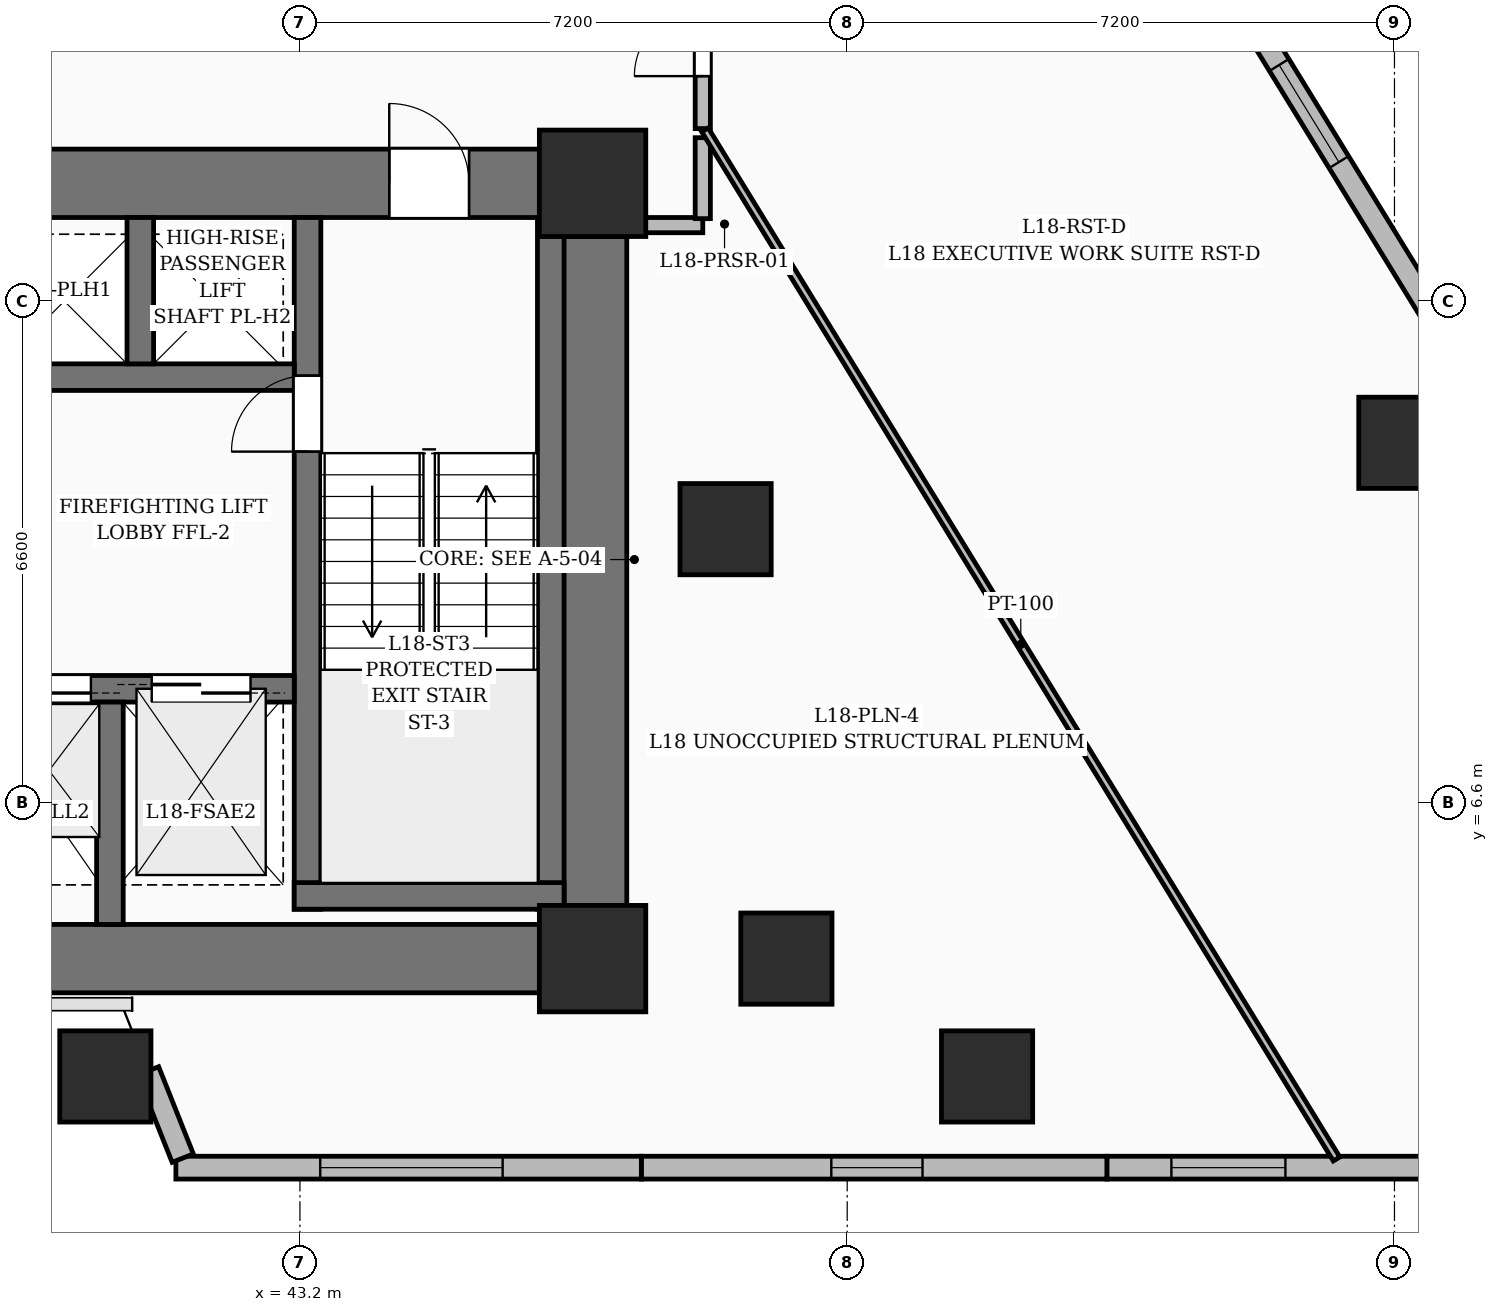
"""IFC4 building model, lengths in metres.
Left out: names, types, materials, properties, quantities, classifications, styles, units other than length and angle.
Written with IfcOpenShell. Run it as: python <this file> out.ifc"""

import sys

from ifc_helpers import new_model, si_unit, direction, frame, frame_2d, origin, origin_2d, place, context, subcontext, project, spatial, rectangle, extrude, element, fill, save


model = new_model("IFC4")
c1 = context("Model", 3, precision=1e-05, world=origin(), true_north=direction((0.0, 1.0)))
c2 = subcontext(c1, "Body", "Model", "MODEL_VIEW")
j1 = project(units=[si_unit("LENGTHUNIT", "METRE"), si_unit("PLANEANGLEUNIT", "RADIAN")], contexts=[c1])
p1 = place(None, origin())
s1 = spatial("IfcSite", under=j1, at=p1, CompositionType="ELEMENT")
p2 = place(p1, origin())
s2 = spatial("IfcBuilding", under=s1, at=p2, CompositionType="ELEMENT")
p3 = place(p2, frame((0.0, 0.0, 75.0)))
s3 = spatial("IfcBuildingStorey", under=s2, at=p3, CompositionType="ELEMENT", Elevation=75.0)
for number, where, z_axis, x_axis in (
    (1, (47.05, 4.55, 0.0), (0.0, 0.0, 1.0), (1.0, 0.0, 0.0)),
    (2, (47.05, 14.75, 0.0), (0.0, 0.0, 1.0), (1.0, 0.0, 0.0)),
):
    element("IfcColumn", number, at=place(p3, frame(where, z_axis=z_axis, x_axis=x_axis)), inside=s3, PredefinedType="COLUMN", context=c2, shape_type="SweptSolid", body=[
        extrude(rectangle(XDim=1.4, YDim=1.4, at=origin_2d()), origin(), (0.0, 0.0, 1.0), 3.6),
    ])
for number, where, z_axis, x_axis in (
    (3, (49.6, 4.55, 0.0), (0.0, 0.0, 1.0), (1.0, 0.0, 0.0)),
    (4, (48.8, 10.2, 0.0), (0.0, 0.0, 1.0), (1.0, 0.0, 0.0)),
):
    element("IfcColumn", number, at=place(p3, frame(where, z_axis=z_axis, x_axis=x_axis)), inside=s3, PredefinedType="COLUMN", context=c2, shape_type="SweptSolid", body=[
        extrude(rectangle(XDim=1.2, YDim=1.2, at=origin_2d()), origin(), (0.0, 0.0, 1.0), 3.6),
    ])
p4 = place(p3, frame((35.85, 4.55, 0.0), z_axis=(0.0, 0.0, 1.0), x_axis=(1.0, 0.0, 0.0)))
e5 = element("IfcWall", 5, at=p4, inside=s3, PredefinedType="SHEAR", context=c2, shape_type="SweptSolid", body=[
    extrude(rectangle(XDim=10.5, YDim=0.9, at=frame_2d((5.25, 0.0))), origin(), (0.0, 0.0, 1.0), 3.6),
])
p5 = place(p3, frame((35.85, 14.75, 0.0), z_axis=(0.0, 0.0, 1.0), x_axis=(1.0, 0.0, 0.0)))
e6 = element("IfcWall", 6, at=p5, inside=s3, PredefinedType="SHEAR", context=c2, shape_type="SweptSolid", body=[
    extrude(rectangle(XDim=10.5, YDim=0.9, at=frame_2d((5.25, 0.0))), origin(), (0.0, 0.0, 1.0), 3.6),
])
p6 = place(p5, frame((0.925, 0.0, 0.0)))
e7 = element("IfcOpeningElement", 7, at=p6, cuts=e6, PredefinedType="OPENING", context=c2, shape_type="SweptSolid", body=[
    extrude(rectangle(XDim=1.05, YDim=2.15, at=frame_2d((0.525, 1.075))), frame((0.0, 0.46, 0.0), z_axis=(0.0, -1.0, 0.0), x_axis=(1.0, 0.0, 0.0)), (0.0, 0.0, 1.0), 0.92),
])
p7 = place(p5, frame((8.525, 0.0, 0.0)))
e8 = element("IfcOpeningElement", 8, at=p7, cuts=e6, PredefinedType="OPENING", context=c2, shape_type="SweptSolid", body=[
    extrude(rectangle(XDim=1.05, YDim=2.15, at=frame_2d((0.525, 1.075))), frame((0.0, 0.46, 0.0), z_axis=(0.0, -1.0, 0.0), x_axis=(1.0, 0.0, 0.0)), (0.0, 0.0, 1.0), 0.92),
])
p8 = place(p3, frame((47.05, 5.25, 0.0), z_axis=(0.0, 0.0, 1.0), x_axis=(0.0, 1.0, 0.0)))
e9 = element("IfcWall", 9, at=p8, inside=s3, PredefinedType="SHEAR", context=c2, shape_type="SweptSolid", body=[
    extrude(rectangle(XDim=8.8, YDim=0.9, at=frame_2d((4.4, 0.0))), origin(), (0.0, 0.0, 1.0), 3.6),
])
p9 = place(p3, frame((43.3, 5.2, 0.0), z_axis=(0.0, 0.0, 1.0), x_axis=(0.0, 1.0, 0.0)))
e10 = element("IfcWall", 10, at=p9, inside=s3, PredefinedType="SOLIDWALL", context=c2, shape_type="SweptSolid", body=[
    extrude(rectangle(XDim=9.1, YDim=0.35, at=frame_2d((4.55, 0.0))), origin(), (0.0, 0.0, 1.0), 3.6),
])
p10 = place(p9, frame((6.02, 0.0, 0.0)))
e11 = element("IfcOpeningElement", 11, at=p10, cuts=e10, PredefinedType="OPENING", context=c2, shape_type="SweptSolid", body=[
    extrude(rectangle(XDim=1.0, YDim=2.15, at=frame_2d((0.5, 1.075))), frame((0.0, 0.185, 0.0), z_axis=(0.0, -1.0, 0.0), x_axis=(1.0, 0.0, 0.0)), (0.0, 0.0, 1.0), 0.37),
])
p11 = place(p3, frame((46.5, 5.2, 0.0), z_axis=(0.0, 0.0, 1.0), x_axis=(0.0, 1.0, 0.0)))
e12 = element("IfcWall", 12, at=p11, inside=s3, PredefinedType="SOLIDWALL", context=c2, shape_type="SweptSolid", body=[
    extrude(rectangle(XDim=9.1, YDim=0.35, at=frame_2d((4.55, 0.0))), origin(), (0.0, 0.0, 1.0), 3.6),
])
p12 = place(p3, frame((43.125, 5.375, 0.0), z_axis=(0.0, 0.0, 1.0), x_axis=(1.0, 0.0, 0.0)))
e13 = element("IfcWall", 13, at=p12, inside=s3, PredefinedType="SOLIDWALL", context=c2, shape_type="SweptSolid", body=[
    extrude(rectangle(XDim=3.55, YDim=0.35, at=frame_2d((1.775, 0.0))), origin(), (0.0, 0.0, 1.0), 3.6),
])
p13 = place(p3, frame((39.075, 8.1, 0.0), z_axis=(0.0, 0.0, 1.0), x_axis=(1.0, 0.0, 0.0)))
e14 = element("IfcWall", 14, at=p13, inside=s3, PredefinedType="SOLIDWALL", context=c2, shape_type="SweptSolid", body=[
    extrude(rectangle(XDim=4.05, YDim=0.35, at=frame_2d((2.025, 0.0))), origin(), (0.0, 0.0, 1.0), 3.6),
])
p14 = place(p13, frame((2.175, 0.0, 0.0)))
e15 = element("IfcOpeningElement", 15, at=p14, cuts=e14, PredefinedType="OPENING", context=c2, shape_type="SweptSolid", body=[
    extrude(rectangle(XDim=1.3, YDim=2.25, at=frame_2d((0.65, 1.125))), frame((0.0, 0.185, 0.0), z_axis=(0.0, -1.0, 0.0), x_axis=(1.0, 0.0, 0.0)), (0.0, 0.0, 1.0), 0.37),
])
p15 = place(p13, frame((0.275, 0.0, 0.0)))
e16 = element("IfcOpeningElement", 16, at=p15, cuts=e14, PredefinedType="OPENING", context=c2, shape_type="SweptSolid", body=[
    extrude(rectangle(XDim=1.1, YDim=2.2, at=frame_2d((0.55, 1.1))), frame((0.0, 0.185, 0.0), z_axis=(0.0, -1.0, 0.0), x_axis=(1.0, 0.0, 0.0)), (0.0, 0.0, 1.0), 0.37),
])
p16 = place(p3, frame((40.7, 5.0, 0.0), z_axis=(0.0, 0.0, 1.0), x_axis=(0.0, 1.0, 0.0)))
e17 = element("IfcWall", 17, at=p16, inside=s3, PredefinedType="SOLIDWALL", context=c2, shape_type="SweptSolid", body=[
    extrude(rectangle(XDim=2.925, YDim=0.35, at=frame_2d((1.462, 0.0))), origin(), (0.0, 0.0, 1.0), 3.6),
])
p17 = place(p3, frame((39.075, 12.2, 0.0), z_axis=(0.0, 0.0, 1.0), x_axis=(1.0, 0.0, 0.0)))
e18 = element("IfcWall", 18, at=p17, inside=s3, PredefinedType="SOLIDWALL", context=c2, shape_type="SweptSolid", body=[
    extrude(rectangle(XDim=4.05, YDim=0.35, at=frame_2d((2.025, 0.0))), origin(), (0.0, 0.0, 1.0), 3.6),
])
p18 = place(p3, frame((41.1, 12.375, 0.0), z_axis=(0.0, 0.0, 1.0), x_axis=(0.0, 1.0, 0.0)))
e19 = element("IfcWall", 19, at=p18, inside=s3, PredefinedType="SOLIDWALL", context=c2, shape_type="SweptSolid", body=[
    extrude(rectangle(XDim=1.925, YDim=0.35, at=frame_2d((0.962, 0.0))), origin(), (0.0, 0.0, 1.0), 3.6),
])
for number, where, z_axis, x_axis in (
    (20, (40.64, 3.0, 0.0), (0.0, 0.0, 1.0), (1.0, 0.0, 0.0)),
    (21, (52.24, 3.0, 0.0), (0.0, 0.0, 1.0), (1.0, 0.0, 0.0)),
    (22, (57.73, 11.336, 0.0), (0.0, 0.0, 1.0), (1.0, 0.0, 0.0)),
):
    element("IfcColumn", number, at=place(p3, frame(where, z_axis=z_axis, x_axis=x_axis)), inside=s3, PredefinedType="COLUMN", context=c2, shape_type="SweptSolid", body=[
        extrude(rectangle(XDim=1.2, YDim=1.2, at=origin_2d()), origin(), (0.0, 0.0, 1.0), 3.6),
    ])
p19 = place(p3, frame((54.041, 19.629, 0.0), z_axis=(0.0, 0.0, 1.0), x_axis=(0.523661280051, -0.851926560083, 0.0)))
e23 = element("IfcWall", 23, at=p19, inside=s3, PredefinedType="SOLIDWALL", context=c2, shape_type="SweptSolid", body=[
    extrude(rectangle(XDim=7.934, YDim=0.3, at=frame_2d((3.967, 0.0))), origin(), (0.0, 0.0, 1.0), 3.35),
])
p20 = place(p19, frame((3.9, 0.0, 0.6)))
e24 = element("IfcOpeningElement", 24, at=p20, cuts=e23, PredefinedType="OPENING", context=c2, shape_type="SweptSolid", body=[
    extrude(rectangle(XDim=1.5, YDim=2.1, at=frame_2d((0.75, 1.05))), frame((0.0, 0.16, 0.0), z_axis=(0.0, -1.0, 0.0), x_axis=(1.0, 0.0, 0.0)), (0.0, 0.0, 1.0), 0.32),
])
p21 = place(p3, frame((59.34, 1.8, 0.0), z_axis=(0.0, 0.0, 1.0), x_axis=(-1.0, 0.0, 0.0)))
e25 = element("IfcWall", 25, at=p21, inside=s3, PredefinedType="SOLIDWALL", context=c2, shape_type="SweptSolid", body=[
    extrude(rectangle(XDim=5.524, YDim=0.3, at=frame_2d((2.762, 0.0))), origin(), (0.0, 0.0, 1.0), 3.35),
])
p22 = place(p21, frame((3.175, 0.0, 0.6)))
e26 = element("IfcOpeningElement", 26, at=p22, cuts=e25, PredefinedType="OPENING", context=c2, shape_type="SweptSolid", body=[
    extrude(rectangle(XDim=1.5, YDim=2.1, at=frame_2d((0.75, 1.05))), frame((0.0, 0.16, 0.0), z_axis=(0.0, -1.0, 0.0), x_axis=(1.0, 0.0, 0.0)), (0.0, 0.0, 1.0), 0.32),
])
p23 = place(p3, frame((53.816, 1.8, 0.0), z_axis=(0.0, 0.0, 1.0), x_axis=(-1.0, 0.0, 0.0)))
e27 = element("IfcWall", 27, at=p23, inside=s3, PredefinedType="SOLIDWALL", context=c2, shape_type="SweptSolid", body=[
    extrude(rectangle(XDim=6.124, YDim=0.3, at=frame_2d((3.062, 0.0))), origin(), (0.0, 0.0, 1.0), 3.35),
])
p24 = place(p23, frame((2.425, 0.0, 0.8)))
e28 = element("IfcOpeningElement", 28, at=p24, cuts=e27, PredefinedType="OPENING", context=c2, shape_type="SweptSolid", body=[
    extrude(rectangle(XDim=1.2, YDim=1.8, at=frame_2d((0.6, 0.9))), frame((0.0, 0.16, 0.0), z_axis=(0.0, -1.0, 0.0), x_axis=(1.0, 0.0, 0.0)), (0.0, 0.0, 1.0), 0.32),
])
p25 = place(p3, frame((47.692, 1.8, 0.0), z_axis=(0.0, 0.0, 1.0), x_axis=(-1.0, 0.0, 0.0)))
e29 = element("IfcWall", 29, at=p25, inside=s3, PredefinedType="SOLIDWALL", context=c2, shape_type="SweptSolid", body=[
    extrude(rectangle(XDim=6.124, YDim=0.3, at=frame_2d((3.062, 0.0))), origin(), (0.0, 0.0, 1.0), 3.35),
])
p26 = place(p25, frame((1.825, 0.0, 0.6)))
e30 = element("IfcOpeningElement", 30, at=p26, cuts=e29, PredefinedType="OPENING", context=c2, shape_type="SweptSolid", body=[
    extrude(rectangle(XDim=2.4, YDim=2.1, at=frame_2d((1.2, 1.05))), frame((0.0, 0.16, 0.0), z_axis=(0.0, -1.0, 0.0), x_axis=(1.0, 0.0, 0.0)), (0.0, 0.0, 1.0), 0.32),
])
p27 = place(p3, frame((41.658, 1.925, 0.0), z_axis=(0.0, 0.0, 1.0), x_axis=(-0.369583004586, 0.929197719929, 0.0)))
e31 = element("IfcWall", 31, at=p27, inside=s3, PredefinedType="SOLIDWALL", context=c2, shape_type="SweptSolid", body=[
    extrude(rectangle(XDim=1.235, YDim=0.3, at=frame_2d((0.617, 0.0))), origin(), (0.0, 0.0, 1.0), 2.375),
])
p28 = place(p3, frame((47.5, 14.2, 0.0), z_axis=(0.0, 0.0, 1.0), x_axis=(1.0, 0.0, 0.0)))
e32 = element("IfcWall", 32, at=p28, inside=s3, PredefinedType="PARTITIONING", context=c2, shape_type="SweptSolid", body=[
    extrude(rectangle(XDim=1.0, YDim=0.2, at=frame_2d((0.5, 0.0))), origin(), (0.0, 0.0, 1.0), 3.35),
])
p29 = place(p3, frame((48.5, 14.285, 0.0), z_axis=(0.0, 0.0, 1.0), x_axis=(0.0, 1.0, 0.0)))
e33 = element("IfcWall", 33, at=p29, inside=s3, PredefinedType="PARTITIONING", context=c2, shape_type="SweptSolid", body=[
    extrude(rectangle(XDim=1.065, YDim=0.2, at=frame_2d((0.533, 0.0))), origin(), (0.0, 0.0, 1.0), 3.35),
])
p30 = place(p3, frame((48.5, 15.47, 0.0), z_axis=(0.0, 0.0, 1.0), x_axis=(0.0, 1.0, 0.0)))
e34 = element("IfcWall", 34, at=p30, inside=s3, PredefinedType="PARTITIONING", context=c2, shape_type="SweptSolid", body=[
    extrude(rectangle(XDim=2.28, YDim=0.2, at=frame_2d((1.14, 0.0))), origin(), (0.0, 0.0, 1.0), 2.345),
])
p31 = place(p30, frame((0.69, 0.0, 0.0)))
e35 = element("IfcOpeningElement", 35, at=p31, cuts=e34, PredefinedType="OPENING", context=c2, shape_type="SweptSolid", body=[
    extrude(rectangle(XDim=0.9, YDim=2.1, at=frame_2d((0.45, 1.05))), frame((0.0, 0.11, 0.0), z_axis=(0.0, -1.0, 0.0), x_axis=(1.0, 0.0, 0.0)), (0.0, 0.0, 1.0), 0.22),
])
p32 = place(p3, frame((48.529, 15.453, 0.0), z_axis=(0.0, 0.0, 1.0), x_axis=(0.52306290803, -0.852294077325, 0.0)))
e36 = element("IfcWall", 36, at=p32, inside=s3, PredefinedType="PARTITIONING", context=c2, shape_type="SweptSolid", body=[
    extrude(rectangle(XDim=15.885, YDim=0.1, at=frame_2d((7.943, 0.0))), origin(), (0.0, 0.0, 1.0), 2.345),
])
p33 = place(p20, origin())
e37 = element("IfcWindow", 37, at=p33, inside=s3, PartitioningType="SINGLE_PANEL", PredefinedType="WINDOW", context=c2, shape_type="SweptSolid", body=[
    extrude(rectangle(XDim=1.5, YDim=2.1, at=frame_2d((0.75, 1.05))), frame((0.0, 0.03, 0.0), z_axis=(0.0, -1.0, 0.0), x_axis=(1.0, 0.0, 0.0)), (0.0, 0.0, 1.0), 0.06),
])
fill(e24, e37)
p34 = place(p22, origin())
e38 = element("IfcWindow", 38, at=p34, inside=s3, PartitioningType="SINGLE_PANEL", PredefinedType="WINDOW", context=c2, shape_type="SweptSolid", body=[
    extrude(rectangle(XDim=1.5, YDim=2.1, at=frame_2d((0.75, 1.05))), frame((0.0, 0.03, 0.0), z_axis=(0.0, -1.0, 0.0), x_axis=(1.0, 0.0, 0.0)), (0.0, 0.0, 1.0), 0.06),
])
fill(e26, e38)
p35 = place(p24, origin())
e39 = element("IfcWindow", 39, at=p35, inside=s3, PartitioningType="SINGLE_PANEL", PredefinedType="WINDOW", context=c2, shape_type="SweptSolid", body=[
    extrude(rectangle(XDim=1.2, YDim=1.8, at=frame_2d((0.6, 0.9))), frame((0.0, 0.03, 0.0), z_axis=(0.0, -1.0, 0.0), x_axis=(1.0, 0.0, 0.0)), (0.0, 0.0, 1.0), 0.06),
])
fill(e28, e39)
p36 = place(p26, origin())
e40 = element("IfcWindow", 40, at=p36, inside=s3, PartitioningType="SINGLE_PANEL", PredefinedType="WINDOW", context=c2, shape_type="SweptSolid", body=[
    extrude(rectangle(XDim=2.4, YDim=2.1, at=frame_2d((1.2, 1.05))), frame((0.0, 0.03, 0.0), z_axis=(0.0, -1.0, 0.0), x_axis=(1.0, 0.0, 0.0)), (0.0, 0.0, 1.0), 0.06),
])
fill(e30, e40)
p37 = place(p7, origin())
e41 = element("IfcDoor", 41, at=p37, inside=s3, OperationType="SINGLE_SWING_LEFT", PredefinedType="DOOR", context=c2, shape_type="SweptSolid", body=[
    extrude(rectangle(XDim=1.05, YDim=2.15, at=frame_2d((0.525, 1.075))), frame((0.0, 0.025, 0.0), z_axis=(0.0, -1.0, 0.0), x_axis=(1.0, 0.0, 0.0)), (0.0, 0.0, 1.0), 0.05),
])
fill(e8, e41)
p38 = place(p10, origin())
e42 = element("IfcDoor", 42, at=p38, inside=s3, OperationType="SINGLE_SWING_LEFT", PredefinedType="DOOR", context=c2, shape_type="SweptSolid", body=[
    extrude(rectangle(XDim=1.0, YDim=2.15, at=frame_2d((0.5, 1.075))), frame((0.0, 0.025, 0.0), z_axis=(0.0, -1.0, 0.0), x_axis=(1.0, 0.0, 0.0)), (0.0, 0.0, 1.0), 0.05),
])
fill(e11, e42)
p39 = place(p14, origin())
e43 = element("IfcDoor", 43, at=p39, inside=s3, OperationType="DOUBLE_DOOR_SLIDING", PredefinedType="DOOR", context=c2, shape_type="SweptSolid", body=[
    extrude(rectangle(XDim=1.3, YDim=2.25, at=frame_2d((0.65, 1.125))), frame((0.0, 0.025, 0.0), z_axis=(0.0, -1.0, 0.0), x_axis=(1.0, 0.0, 0.0)), (0.0, 0.0, 1.0), 0.05),
])
fill(e15, e43)
p40 = place(p15, origin())
e44 = element("IfcDoor", 44, at=p40, inside=s3, OperationType="DOUBLE_DOOR_SLIDING", PredefinedType="DOOR", context=c2, shape_type="SweptSolid", body=[
    extrude(rectangle(XDim=1.1, YDim=2.2, at=frame_2d((0.55, 1.1))), frame((0.0, 0.025, 0.0), z_axis=(0.0, -1.0, 0.0), x_axis=(1.0, 0.0, 0.0)), (0.0, 0.0, 1.0), 0.05),
])
fill(e16, e44)
p41 = place(p31, origin())
e45 = element("IfcDoor", 45, at=p41, inside=s3, OperationType="SINGLE_SWING_LEFT", PredefinedType="DOOR", context=c2, shape_type="SweptSolid", body=[
    extrude(rectangle(XDim=0.9, YDim=2.1, at=frame_2d((0.45, 1.05))), frame((0.0, 0.025, 0.0), z_axis=(0.0, -1.0, 0.0), x_axis=(1.0, 0.0, 0.0)), (0.0, 0.0, 1.0), 0.05),
])
fill(e35, e45)
save(model, sys.argv[1])
